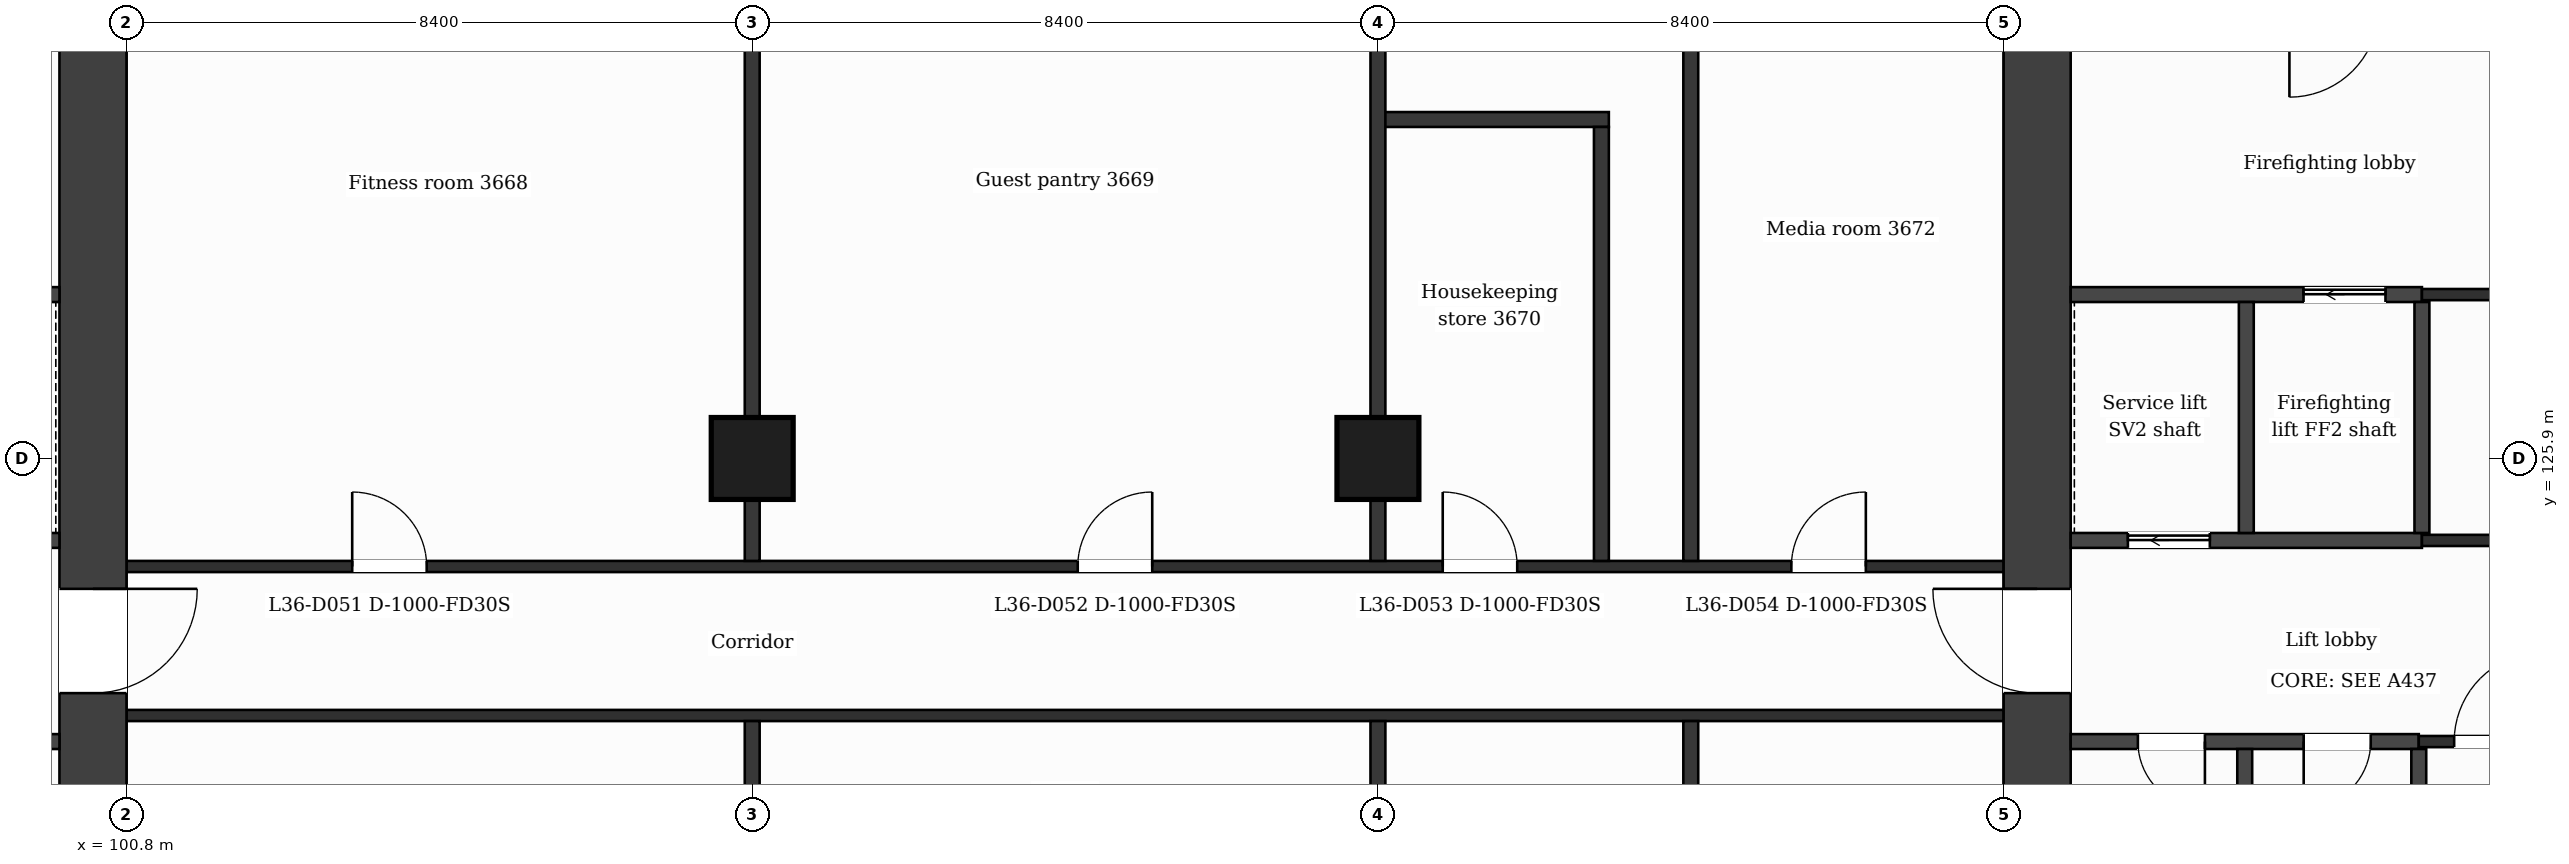
"""IFC4 building model, lengths in metres.
Left out: names, types, materials, properties, quantities, classifications, styles, units other than length and angle.
Written with IfcOpenShell. Run it as: python <this file> out.ifc"""

import sys

from ifc_helpers import new_model, si_unit, direction, frame, frame_2d, origin, origin_2d, place, context, subcontext, project, spatial, rectangle, extrude, element, fill, save


model = new_model("IFC4")
c1 = context("Model", 3, precision=1e-05, world=origin(), true_north=direction((0.0, 1.0)))
c2 = subcontext(c1, "Body", "Model", "MODEL_VIEW")
j1 = project(units=[si_unit("LENGTHUNIT", "METRE"), si_unit("PLANEANGLEUNIT", "RADIAN")], contexts=[c1])
p1 = place(None, origin())
s1 = spatial("IfcSite", under=j1, at=p1, CompositionType="ELEMENT")
p2 = place(p1, origin())
s2 = spatial("IfcBuilding", under=s1, at=p2, CompositionType="ELEMENT")
p3 = place(p2, frame((0.0, 0.0, 155.2)))
s3 = spatial("IfcBuildingStorey", under=s2, at=p3, CompositionType="ELEMENT", Elevation=155.2)
p4 = place(p3, frame((100.35, 131.95, 0.0), z_axis=(0.0, 0.0, 1.0), x_axis=(0.0, -1.0, 0.0)))
e1 = element("IfcWall", 1, at=p4, inside=s3, PredefinedType="SHEAR", context=c2, shape_type="SweptSolid", body=[
    extrude(rectangle(XDim=21.1, YDim=0.9, at=frame_2d((10.55, 0.0))), origin(), (0.0, 0.0, 1.0), 3.7),
])
p5 = place(p4, frame((7.8, 0.0, 0.0)))
e2 = element("IfcOpeningElement", 2, at=p5, cuts=e1, PredefinedType="OPENING", context=c2, shape_type="SweptSolid", body=[
    extrude(rectangle(XDim=1.4, YDim=2.1, at=frame_2d((0.7, 1.05))), frame((0.0, 0.46, 0.0), z_axis=(0.0, -1.0, 0.0), x_axis=(1.0, 0.0, 0.0)), (0.0, 0.0, 1.0), 0.92),
])
p6 = place(p3, frame((126.45, 110.85, 0.0), z_axis=(0.0, 0.0, 1.0), x_axis=(0.0, 1.0, 0.0)))
e3 = element("IfcWall", 3, at=p6, inside=s3, PredefinedType="SHEAR", context=c2, shape_type="SweptSolid", body=[
    extrude(rectangle(XDim=21.1, YDim=0.9, at=frame_2d((10.55, 0.0))), origin(), (0.0, 0.0, 1.0), 3.7),
])
p7 = place(p6, frame((11.9, 0.0, 0.0)))
e4 = element("IfcOpeningElement", 4, at=p7, cuts=e3, PredefinedType="OPENING", context=c2, shape_type="SweptSolid", body=[
    extrude(rectangle(XDim=1.4, YDim=2.1, at=frame_2d((0.7, 1.05))), frame((0.0, 0.46, 0.0), z_axis=(0.0, -1.0, 0.0), x_axis=(1.0, 0.0, 0.0)), (0.0, 0.0, 1.0), 0.92),
])
for number, where, z_axis, x_axis in (
    (5, (109.2, 125.9, 0.0), (0.0, 0.0, 1.0), (1.0, 0.0, 0.0)),
    (6, (117.6, 125.9, 0.0), (0.0, 0.0, 1.0), (1.0, 0.0, 0.0)),
):
    element("IfcColumn", number, at=place(p3, frame(where, z_axis=z_axis, x_axis=x_axis)), inside=s3, PredefinedType="COLUMN", context=c2, shape_type="SweptSolid", body=[
        extrude(rectangle(XDim=1.1, YDim=1.1, at=origin_2d()), origin(), (0.0, 0.0, 1.0), 3.7),
    ])
p8 = place(p3, frame((95.227, 122.1, 0.0), z_axis=(0.0, 0.0, 1.0), x_axis=(1.0, 0.0, 0.0)))
e7 = element("IfcWall", 7, at=p8, inside=s3, PredefinedType="PARTITIONING", context=c2, shape_type="SweptSolid", body=[
    extrude(rectangle(XDim=4.673, YDim=0.2, at=frame_2d((2.336, 0.0))), origin(), (0.0, 0.0, 1.0), 3.38),
])
p9 = place(p8, frame((0.718, 0.0, 0.0)))
e8 = element("IfcOpeningElement", 8, at=p9, cuts=e7, PredefinedType="OPENING", context=c2, shape_type="SweptSolid", body=[
    extrude(rectangle(XDim=0.9, YDim=2.1, at=frame_2d((0.45, 1.05))), frame((0.0, 0.11, 0.0), z_axis=(0.0, -1.0, 0.0), x_axis=(1.0, 0.0, 0.0)), (0.0, 0.0, 1.0), 0.22),
])
p10 = place(p8, frame((3.055, 0.0, 0.0)))
e9 = element("IfcOpeningElement", 9, at=p10, cuts=e7, PredefinedType="OPENING", context=c2, shape_type="SweptSolid", body=[
    extrude(rectangle(XDim=0.9, YDim=2.1, at=frame_2d((0.45, 1.05))), frame((0.0, 0.11, 0.0), z_axis=(0.0, -1.0, 0.0), x_axis=(1.0, 0.0, 0.0)), (0.0, 0.0, 1.0), 0.22),
])
p11 = place(p3, frame((126.9, 122.1, 0.0), z_axis=(0.0, 0.0, 1.0), x_axis=(1.0, 0.0, 0.0)))
e10 = element("IfcWall", 10, at=p11, inside=s3, PredefinedType="PARTITIONING", context=c2, shape_type="SweptSolid", body=[
    extrude(rectangle(XDim=4.673, YDim=0.2, at=frame_2d((2.336, 0.0))), origin(), (0.0, 0.0, 1.0), 3.38),
])
p12 = place(p11, frame((3.128, 0.0, 0.0)))
e11 = element("IfcOpeningElement", 11, at=p12, cuts=e10, PredefinedType="OPENING", context=c2, shape_type="SweptSolid", body=[
    extrude(rectangle(XDim=0.9, YDim=2.1, at=frame_2d((0.45, 1.05))), frame((0.0, 0.11, 0.0), z_axis=(0.0, -1.0, 0.0), x_axis=(1.0, 0.0, 0.0)), (0.0, 0.0, 1.0), 0.22),
])
p13 = place(p11, frame((0.902, 0.0, 0.0)))
e12 = element("IfcOpeningElement", 12, at=p13, cuts=e10, PredefinedType="OPENING", context=c2, shape_type="SweptSolid", body=[
    extrude(rectangle(XDim=0.9, YDim=2.1, at=frame_2d((0.45, 1.05))), frame((0.0, 0.11, 0.0), z_axis=(0.0, -1.0, 0.0), x_axis=(1.0, 0.0, 0.0)), (0.0, 0.0, 1.0), 0.22),
])
p14 = place(p3, frame((131.573, 122.1, 0.0), z_axis=(0.0, 0.0, 1.0), x_axis=(1.0, 0.0, 0.0)))
e13 = element("IfcWall", 13, at=p14, inside=s3, PredefinedType="PARTITIONING", context=c2, shape_type="SweptSolid", body=[
    extrude(rectangle(XDim=2.4, YDim=0.15, at=frame_2d((1.2, 0.0))), origin(), (0.0, 0.0, 1.0), 3.38),
])
p15 = place(p14, frame((0.475, 0.0, 0.0)))
e14 = element("IfcOpeningElement", 14, at=p15, cuts=e13, PredefinedType="OPENING", context=c2, shape_type="SweptSolid", body=[
    extrude(rectangle(XDim=1.2, YDim=2.1, at=frame_2d((0.6, 1.05))), frame((0.0, 0.085, 0.0), z_axis=(0.0, -1.0, 0.0), x_axis=(1.0, 0.0, 0.0)), (0.0, 0.0, 1.0), 0.17),
])
p16 = place(p3, frame((100.8, 122.45, 0.0), z_axis=(0.0, 0.0, 1.0), x_axis=(1.0, 0.0, 0.0)))
e15 = element("IfcWall", 15, at=p16, inside=s3, PredefinedType="PARTITIONING", context=c2, shape_type="SweptSolid", body=[
    extrude(rectangle(XDim=25.2, YDim=0.15, at=frame_2d((12.6, 0.0))), origin(), (0.0, 0.0, 1.0), 3.38),
])
p17 = place(p3, frame((100.8, 124.45, 0.0), z_axis=(0.0, 0.0, 1.0), x_axis=(1.0, 0.0, 0.0)))
e16 = element("IfcWall", 16, at=p17, inside=s3, PredefinedType="PARTITIONING", context=c2, shape_type="SweptSolid", body=[
    extrude(rectangle(XDim=25.2, YDim=0.15, at=frame_2d((12.6, 0.0))), origin(), (0.0, 0.0, 1.0), 3.38),
])
p18 = place(p17, frame((3.03, 0.0, 0.0)))
e17 = element("IfcOpeningElement", 17, at=p18, cuts=e16, PredefinedType="OPENING", context=c2, shape_type="SweptSolid", body=[
    extrude(rectangle(XDim=1.0, YDim=2.1, at=frame_2d((0.5, 1.05))), frame((0.0, 0.085, 0.0), z_axis=(0.0, -1.0, 0.0), x_axis=(1.0, 0.0, 0.0)), (0.0, 0.0, 1.0), 0.17),
])
p19 = place(p17, frame((12.77, 0.0, 0.0)))
e18 = element("IfcOpeningElement", 18, at=p19, cuts=e16, PredefinedType="OPENING", context=c2, shape_type="SweptSolid", body=[
    extrude(rectangle(XDim=1.0, YDim=2.1, at=frame_2d((0.5, 1.05))), frame((0.0, 0.085, 0.0), z_axis=(0.0, -1.0, 0.0), x_axis=(1.0, 0.0, 0.0)), (0.0, 0.0, 1.0), 0.17),
])
p20 = place(p17, frame((17.67, 0.0, 0.0)))
e19 = element("IfcOpeningElement", 19, at=p20, cuts=e16, PredefinedType="OPENING", context=c2, shape_type="SweptSolid", body=[
    extrude(rectangle(XDim=1.0, YDim=2.1, at=frame_2d((0.5, 1.05))), frame((0.0, 0.085, 0.0), z_axis=(0.0, -1.0, 0.0), x_axis=(1.0, 0.0, 0.0)), (0.0, 0.0, 1.0), 0.17),
])
p21 = place(p17, frame((22.35, 0.0, 0.0)))
e20 = element("IfcOpeningElement", 20, at=p21, cuts=e16, PredefinedType="OPENING", context=c2, shape_type="SweptSolid", body=[
    extrude(rectangle(XDim=1.0, YDim=2.1, at=frame_2d((0.5, 1.05))), frame((0.0, 0.085, 0.0), z_axis=(0.0, -1.0, 0.0), x_axis=(1.0, 0.0, 0.0)), (0.0, 0.0, 1.0), 0.17),
])
p22 = place(p3, frame((92.702, 124.8, 0.0), z_axis=(0.0, 0.0, 1.0), x_axis=(1.0, 0.0, 0.0)))
e21 = element("IfcWall", 21, at=p22, inside=s3, PredefinedType="PARTITIONING", context=c2, shape_type="SweptSolid", body=[
    extrude(rectangle(XDim=7.198, YDim=0.2, at=frame_2d((3.599, 0.0))), origin(), (0.0, 0.0, 1.0), 3.38),
])
p23 = place(p22, frame((5.609, 0.0, 0.0)))
e22 = element("IfcOpeningElement", 22, at=p23, cuts=e21, PredefinedType="OPENING", context=c2, shape_type="SweptSolid", body=[
    extrude(rectangle(XDim=1.1, YDim=2.1, at=frame_2d((0.55, 1.05))), frame((0.0, 0.11, 0.0), z_axis=(0.0, -1.0, 0.0), x_axis=(1.0, 0.0, 0.0)), (0.0, 0.0, 1.0), 0.22),
])
p24 = place(p3, frame((126.9, 124.8, 0.0), z_axis=(0.0, 0.0, 1.0), x_axis=(1.0, 0.0, 0.0)))
e23 = element("IfcWall", 23, at=p24, inside=s3, PredefinedType="PARTITIONING", context=c2, shape_type="SweptSolid", body=[
    extrude(rectangle(XDim=4.715, YDim=0.2, at=frame_2d((2.358, 0.0))), origin(), (0.0, 0.0, 1.0), 3.38),
])
p25 = place(p24, frame((0.768, 0.0, 0.0)))
e24 = element("IfcOpeningElement", 24, at=p25, cuts=e23, PredefinedType="OPENING", context=c2, shape_type="SweptSolid", body=[
    extrude(rectangle(XDim=1.1, YDim=2.1, at=frame_2d((0.55, 1.05))), frame((0.0, 0.11, 0.0), z_axis=(0.0, -1.0, 0.0), x_axis=(1.0, 0.0, 0.0)), (0.0, 0.0, 1.0), 0.22),
])
p26 = place(p3, frame((131.615, 124.8, 0.0), z_axis=(0.0, 0.0, 1.0), x_axis=(1.0, 0.0, 0.0)))
e25 = element("IfcWall", 25, at=p26, inside=s3, PredefinedType="PARTITIONING", context=c2, shape_type="SweptSolid", body=[
    extrude(rectangle(XDim=2.483, YDim=0.15, at=frame_2d((1.241, 0.0))), origin(), (0.0, 0.0, 1.0), 3.38),
])
p27 = place(p3, frame((92.827, 128.1, 0.0), z_axis=(0.0, 0.0, 1.0), x_axis=(1.0, 0.0, 0.0)))
e26 = element("IfcWall", 26, at=p27, inside=s3, PredefinedType="PARTITIONING", context=c2, shape_type="SweptSolid", body=[
    extrude(rectangle(XDim=7.073, YDim=0.2, at=frame_2d((3.537, 0.0))), origin(), (0.0, 0.0, 1.0), 3.38),
])
p28 = place(p27, frame((3.042, 0.0, 0.0)))
e27 = element("IfcOpeningElement", 27, at=p28, cuts=e26, PredefinedType="OPENING", context=c2, shape_type="SweptSolid", body=[
    extrude(rectangle(XDim=1.1, YDim=2.1, at=frame_2d((0.55, 1.05))), frame((0.0, 0.11, 0.0), z_axis=(0.0, -1.0, 0.0), x_axis=(1.0, 0.0, 0.0)), (0.0, 0.0, 1.0), 0.22),
])
p29 = place(p3, frame((126.9, 128.1, 0.0), z_axis=(0.0, 0.0, 1.0), x_axis=(1.0, 0.0, 0.0)))
e28 = element("IfcWall", 28, at=p29, inside=s3, PredefinedType="PARTITIONING", context=c2, shape_type="SweptSolid", body=[
    extrude(rectangle(XDim=4.715, YDim=0.2, at=frame_2d((2.358, 0.0))), origin(), (0.0, 0.0, 1.0), 3.38),
])
p30 = place(p29, frame((3.126, 0.0, 0.0)))
e29 = element("IfcOpeningElement", 29, at=p30, cuts=e28, PredefinedType="OPENING", context=c2, shape_type="SweptSolid", body=[
    extrude(rectangle(XDim=1.1, YDim=2.1, at=frame_2d((0.55, 1.05))), frame((0.0, 0.11, 0.0), z_axis=(0.0, -1.0, 0.0), x_axis=(1.0, 0.0, 0.0)), (0.0, 0.0, 1.0), 0.22),
])
p31 = place(p3, frame((131.615, 128.1, 0.0), z_axis=(0.0, 0.0, 1.0), x_axis=(1.0, 0.0, 0.0)))
e30 = element("IfcWall", 30, at=p31, inside=s3, PredefinedType="PARTITIONING", context=c2, shape_type="SweptSolid", body=[
    extrude(rectangle(XDim=2.358, YDim=0.15, at=frame_2d((1.179, 0.0))), origin(), (0.0, 0.0, 1.0), 3.38),
])
p32 = place(p3, frame((117.6, 130.45, 0.0), z_axis=(0.0, 0.0, 1.0), x_axis=(1.0, 0.0, 0.0)))
e31 = element("IfcWall", 31, at=p32, inside=s3, PredefinedType="PARTITIONING", context=c2, shape_type="SweptSolid", body=[
    extrude(rectangle(XDim=3.1, YDim=0.2, at=frame_2d((1.55, 0.0))), origin(), (0.0, 0.0, 1.0), 3.38),
])
p33 = place(p3, frame((109.2, 109.075, 0.0), z_axis=(0.0, 0.0, 1.0), x_axis=(0.0, 1.0, 0.0)))
e32 = element("IfcWall", 32, at=p33, inside=s3, PredefinedType="PARTITIONING", context=c2, shape_type="SweptSolid", body=[
    extrude(rectangle(XDim=13.3, YDim=0.2, at=frame_2d((6.65, 0.0))), origin(), (0.0, 0.0, 1.0), 3.38),
])
p34 = place(p3, frame((109.2, 124.525, 0.0), z_axis=(0.0, 0.0, 1.0), x_axis=(0.0, 1.0, 0.0)))
e33 = element("IfcWall", 33, at=p34, inside=s3, PredefinedType="PARTITIONING", context=c2, shape_type="SweptSolid", body=[
    extrude(rectangle(XDim=9.2, YDim=0.2, at=frame_2d((4.6, 0.0))), origin(), (0.0, 0.0, 1.0), 3.38),
])
p35 = place(p3, frame((117.6, 109.075, 0.0), z_axis=(0.0, 0.0, 1.0), x_axis=(0.0, 1.0, 0.0)))
e34 = element("IfcWall", 34, at=p35, inside=s3, PredefinedType="PARTITIONING", context=c2, shape_type="SweptSolid", body=[
    extrude(rectangle(XDim=13.3, YDim=0.2, at=frame_2d((6.65, 0.0))), origin(), (0.0, 0.0, 1.0), 3.38),
])
p36 = place(p3, frame((117.6, 124.525, 0.0), z_axis=(0.0, 0.0, 1.0), x_axis=(0.0, 1.0, 0.0)))
e35 = element("IfcWall", 35, at=p36, inside=s3, PredefinedType="PARTITIONING", context=c2, shape_type="SweptSolid", body=[
    extrude(rectangle(XDim=9.2, YDim=0.2, at=frame_2d((4.6, 0.0))), origin(), (0.0, 0.0, 1.0), 3.38),
])
p37 = place(p3, frame((120.6, 124.525, 0.0), z_axis=(0.0, 0.0, 1.0), x_axis=(0.0, 1.0, 0.0)))
e36 = element("IfcWall", 36, at=p37, inside=s3, PredefinedType="PARTITIONING", context=c2, shape_type="SweptSolid", body=[
    extrude(rectangle(XDim=5.825, YDim=0.2, at=frame_2d((2.913, 0.0))), origin(), (0.0, 0.0, 1.0), 3.38),
])
p38 = place(p3, frame((121.8, 109.075, 0.0), z_axis=(0.0, 0.0, 1.0), x_axis=(0.0, 1.0, 0.0)))
e37 = element("IfcWall", 37, at=p38, inside=s3, PredefinedType="PARTITIONING", context=c2, shape_type="SweptSolid", body=[
    extrude(rectangle(XDim=13.3, YDim=0.2, at=frame_2d((6.65, 0.0))), origin(), (0.0, 0.0, 1.0), 3.38),
])
p39 = place(p3, frame((121.8, 124.525, 0.0), z_axis=(0.0, 0.0, 1.0), x_axis=(0.0, 1.0, 0.0)))
e38 = element("IfcWall", 38, at=p39, inside=s3, PredefinedType="PARTITIONING", context=c2, shape_type="SweptSolid", body=[
    extrude(rectangle(XDim=9.2, YDim=0.2, at=frame_2d((4.6, 0.0))), origin(), (0.0, 0.0, 1.0), 3.38),
])
for number, where, z_axis, x_axis in (
    (39, (129.237, 118.9, 0.0), (0.0, 0.0, 1.0), (0.0, 1.0, 0.0)),
    (40, (129.258, 124.9, 0.0), (0.0, 0.0, 1.0), (0.0, 1.0, 0.0)),
):
    element("IfcWall", number, at=place(p3, frame(where, z_axis=z_axis, x_axis=x_axis)), inside=s3, PredefinedType="PARTITIONING", context=c2, shape_type="SweptSolid", body=[
        extrude(rectangle(XDim=3.1, YDim=0.2, at=frame_2d((1.55, 0.0))), origin(), (0.0, 0.0, 1.0), 3.38),
    ])
p40 = place(p3, frame((131.573, 116.87, 0.0), z_axis=(0.0, 0.0, 1.0), x_axis=(0.0, 1.0, 0.0)))
e41 = element("IfcWall", 41, at=p40, inside=s3, PredefinedType="PARTITIONING", context=c2, shape_type="SweptSolid", body=[
    extrude(rectangle(XDim=5.13, YDim=0.2, at=frame_2d((2.565, 0.0))), origin(), (0.0, 0.0, 1.0), 3.38),
])
p41 = place(p40, frame((0.68, 0.0, 0.0)))
e42 = element("IfcOpeningElement", 42, at=p41, cuts=e41, PredefinedType="OPENING", context=c2, shape_type="SweptSolid", body=[
    extrude(rectangle(XDim=0.9, YDim=2.1, at=frame_2d((0.45, 1.05))), frame((0.0, 0.11, 0.0), z_axis=(0.0, -1.0, 0.0), x_axis=(1.0, 0.0, 0.0)), (0.0, 0.0, 1.0), 0.22),
])
p42 = place(p3, frame((131.615, 124.9, 0.0), z_axis=(0.0, 0.0, 1.0), x_axis=(0.0, 1.0, 0.0)))
e43 = element("IfcWall", 43, at=p42, inside=s3, PredefinedType="PARTITIONING", context=c2, shape_type="SweptSolid", body=[
    extrude(rectangle(XDim=3.1, YDim=0.2, at=frame_2d((1.55, 0.0))), origin(), (0.0, 0.0, 1.0), 3.38),
])
p43 = place(p15, origin())
e44 = element("IfcDoor", 44, at=p43, inside=s3, OperationType="SINGLE_SWING_RIGHT", PredefinedType="DOOR", context=c2, shape_type="SweptSolid", body=[
    extrude(rectangle(XDim=1.2, YDim=2.1, at=frame_2d((0.6, 1.05))), frame((0.0, 0.025, 0.0), z_axis=(0.0, -1.0, 0.0), x_axis=(1.0, 0.0, 0.0)), (0.0, 0.0, 1.0), 0.05),
])
fill(e14, e44)
p44 = place(p30, origin())
e45 = element("IfcDoor", 45, at=p44, inside=s3, OperationType="SLIDING_TO_LEFT", PredefinedType="DOOR", context=c2, shape_type="SweptSolid", body=[
    extrude(rectangle(XDim=1.1, YDim=2.1, at=frame_2d((0.55, 1.05))), frame((0.0, 0.025, 0.0), z_axis=(0.0, -1.0, 0.0), x_axis=(1.0, 0.0, 0.0)), (0.0, 0.0, 1.0), 0.05),
])
fill(e29, e45)
p45 = place(p25, origin())
e46 = element("IfcDoor", 46, at=p45, inside=s3, OperationType="SLIDING_TO_LEFT", PredefinedType="DOOR", context=c2, shape_type="SweptSolid", body=[
    extrude(rectangle(XDim=1.1, YDim=2.1, at=frame_2d((0.55, 1.05))), frame((0.0, 0.025, 0.0), z_axis=(0.0, -1.0, 0.0), x_axis=(1.0, 0.0, 0.0)), (0.0, 0.0, 1.0), 0.05),
])
fill(e24, e46)
p46 = place(p12, origin())
e47 = element("IfcDoor", 47, at=p46, inside=s3, OperationType="SINGLE_SWING_LEFT", PredefinedType="DOOR", context=c2, shape_type="SweptSolid", body=[
    extrude(rectangle(XDim=0.9, YDim=2.1, at=frame_2d((0.45, 1.05))), frame((0.0, 0.025, 0.0), z_axis=(0.0, -1.0, 0.0), x_axis=(1.0, 0.0, 0.0)), (0.0, 0.0, 1.0), 0.05),
])
fill(e11, e47)
p47 = place(p13, origin())
e48 = element("IfcDoor", 48, at=p47, inside=s3, OperationType="SINGLE_SWING_RIGHT", PredefinedType="DOOR", context=c2, shape_type="SweptSolid", body=[
    extrude(rectangle(XDim=0.9, YDim=2.1, at=frame_2d((0.45, 1.05))), frame((0.0, 0.025, 0.0), z_axis=(0.0, -1.0, 0.0), x_axis=(1.0, 0.0, 0.0)), (0.0, 0.0, 1.0), 0.05),
])
fill(e12, e48)
p48 = place(p18, origin())
e49 = element("IfcDoor", 49, at=p48, inside=s3, OperationType="SINGLE_SWING_LEFT", PredefinedType="DOOR", context=c2, shape_type="SweptSolid", body=[
    extrude(rectangle(XDim=1.0, YDim=2.1, at=frame_2d((0.5, 1.05))), frame((0.0, 0.025, 0.0), z_axis=(0.0, -1.0, 0.0), x_axis=(1.0, 0.0, 0.0)), (0.0, 0.0, 1.0), 0.05),
])
fill(e17, e49)
p49 = place(p19, origin())
e50 = element("IfcDoor", 50, at=p49, inside=s3, OperationType="SINGLE_SWING_RIGHT", PredefinedType="DOOR", context=c2, shape_type="SweptSolid", body=[
    extrude(rectangle(XDim=1.0, YDim=2.1, at=frame_2d((0.5, 1.05))), frame((0.0, 0.025, 0.0), z_axis=(0.0, -1.0, 0.0), x_axis=(1.0, 0.0, 0.0)), (0.0, 0.0, 1.0), 0.05),
])
fill(e18, e50)
p50 = place(p20, origin())
e51 = element("IfcDoor", 51, at=p50, inside=s3, OperationType="SINGLE_SWING_LEFT", PredefinedType="DOOR", context=c2, shape_type="SweptSolid", body=[
    extrude(rectangle(XDim=1.0, YDim=2.1, at=frame_2d((0.5, 1.05))), frame((0.0, 0.025, 0.0), z_axis=(0.0, -1.0, 0.0), x_axis=(1.0, 0.0, 0.0)), (0.0, 0.0, 1.0), 0.05),
])
fill(e19, e51)
p51 = place(p21, origin())
e52 = element("IfcDoor", 52, at=p51, inside=s3, OperationType="SINGLE_SWING_RIGHT", PredefinedType="DOOR", context=c2, shape_type="SweptSolid", body=[
    extrude(rectangle(XDim=1.0, YDim=2.1, at=frame_2d((0.5, 1.05))), frame((0.0, 0.025, 0.0), z_axis=(0.0, -1.0, 0.0), x_axis=(1.0, 0.0, 0.0)), (0.0, 0.0, 1.0), 0.05),
])
fill(e20, e52)
p52 = place(p5, origin())
e53 = element("IfcDoor", 53, at=p52, inside=s3, OperationType="SINGLE_SWING_LEFT", PredefinedType="DOOR", context=c2, shape_type="SweptSolid", body=[
    extrude(rectangle(XDim=1.4, YDim=2.1, at=frame_2d((0.7, 1.05))), frame((0.0, 0.025, 0.0), z_axis=(0.0, -1.0, 0.0), x_axis=(1.0, 0.0, 0.0)), (0.0, 0.0, 1.0), 0.05),
])
fill(e2, e53)
p53 = place(p7, origin())
e54 = element("IfcDoor", 54, at=p53, inside=s3, OperationType="SINGLE_SWING_RIGHT", PredefinedType="DOOR", context=c2, shape_type="SweptSolid", body=[
    extrude(rectangle(XDim=1.4, YDim=2.1, at=frame_2d((0.7, 1.05))), frame((0.0, 0.025, 0.0), z_axis=(0.0, -1.0, 0.0), x_axis=(1.0, 0.0, 0.0)), (0.0, 0.0, 1.0), 0.05),
])
fill(e4, e54)
save(model, sys.argv[1])
